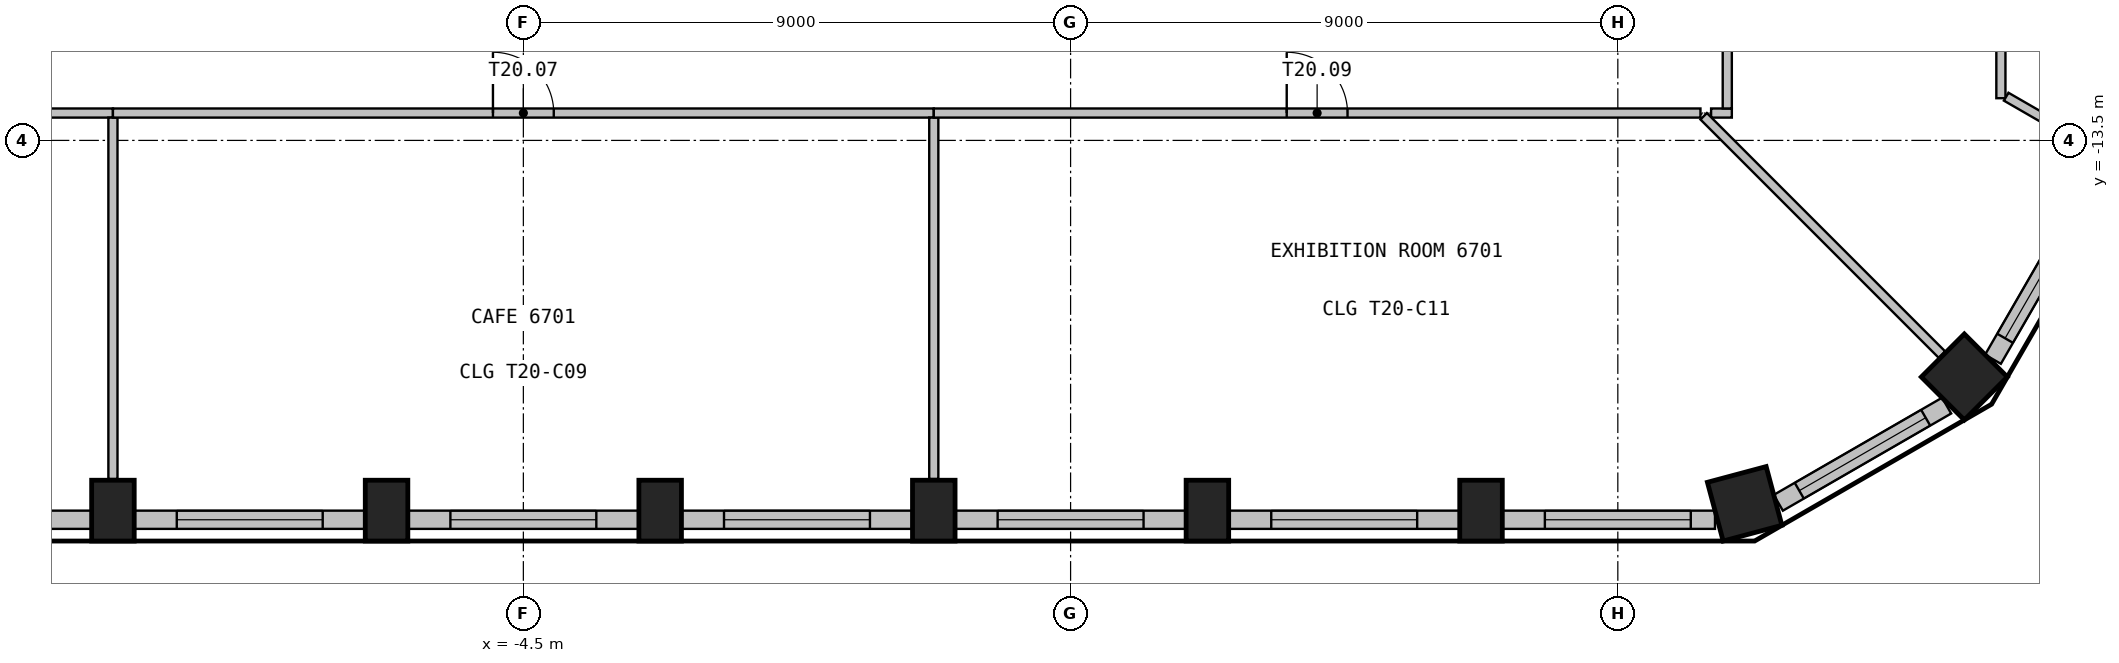
"""IFC4 building model, lengths in metres.
Left out: names, types, materials, properties, quantities, classifications, styles, units other than length and angle.
Written with IfcOpenShell. Run it as: python <this file> out.ifc"""

import sys

from ifc_helpers import new_model, si_unit, direction, frame, frame_2d, origin, origin_2d, place, context, subcontext, project, spatial, rectangle, extrude, element, fill, save


model = new_model("IFC4")
c1 = context("Model", 3, precision=1e-05, world=origin(), true_north=direction((0.0, 1.0)))
c2 = subcontext(c1, "Body", "Model", "MODEL_VIEW")
j1 = project(units=[si_unit("LENGTHUNIT", "METRE"), si_unit("PLANEANGLEUNIT", "RADIAN")], contexts=[c1])
p1 = place(None, origin())
s1 = spatial("IfcSite", under=j1, at=p1, CompositionType="ELEMENT")
p2 = place(p1, origin())
s2 = spatial("IfcBuilding", under=s1, at=p2, CompositionType="ELEMENT")
p3 = place(p2, frame((0.0, 0.0, 270.3)))
s3 = spatial("IfcBuildingStorey", under=s2, at=p3, CompositionType="ELEMENT", Elevation=270.3)
for number, where, z_axis, x_axis in (
    (1, (-11.25, -19.588, 0.0), (0.0, 0.0, 1.0), (1.0, 0.0, 0.0)),
    (2, (-6.75, -19.588, 0.0), (0.0, 0.0, 1.0), (1.0, 0.0, 0.0)),
    (3, (-2.25, -19.588, 0.0), (0.0, 0.0, 1.0), (1.0, 0.0, 0.0)),
    (4, (2.25, -19.588, 0.0), (0.0, 0.0, 1.0), (1.0, 0.0, 0.0)),
    (5, (6.75, -19.588, 0.0), (0.0, 0.0, 1.0), (1.0, 0.0, 0.0)),
    (6, (11.25, -19.588, 0.0), (0.0, 0.0, 1.0), (1.0, 0.0, 0.0)),
):
    element("IfcColumn", number, at=place(p3, frame(where, z_axis=z_axis, x_axis=x_axis)), inside=s3, PredefinedType="COLUMN", context=c2, shape_type="SweptSolid", body=[
        extrude(rectangle(XDim=0.7, YDim=1.0, at=origin_2d()), origin(), (0.0, 0.0, 1.0), 3.575),
    ])
for number, where, z_axis, x_axis in (
    (7, (15.586, -19.476, 0.0), (0.0, 0.0, 1.0), (0.966, 0.259, 0.0)),
    (8, (19.199, -17.39, 0.0), (0.0, 0.0, 1.0), (0.707, 0.707, 0.0)),
):
    element("IfcColumn", number, at=place(p3, frame(where, z_axis=z_axis, x_axis=x_axis)), inside=s3, PredefinedType="COLUMN", context=c2, shape_type="SweptSolid", body=[
        extrude(rectangle(XDim=1.0, YDim=1.0, at=origin_2d()), origin(), (0.0, 0.0, 1.0), 3.575),
    ])
p4 = place(p3, frame((-15.098, -19.739, 0.0), z_axis=(0.0, 0.0, 1.0), x_axis=(1.0, 0.0, 0.0)))
e9 = element("IfcWall", 9, at=p4, inside=s3, PredefinedType="SOLIDWALL", context=c2, shape_type="SweptSolid", body=[
    extrude(rectangle(XDim=3.498, YDim=0.3, at=frame_2d((1.749, 0.0))), origin(), (0.0, 0.0, 1.0), 3.575),
])
p5 = place(p4, frame((0.398, 0.0, 0.9)))
e10 = element("IfcOpeningElement", 10, at=p5, cuts=e9, PredefinedType="OPENING", context=c2, shape_type="SweptSolid", body=[
    extrude(rectangle(XDim=2.4, YDim=2.1, at=frame_2d((1.2, 1.05))), frame((0.0, 0.16, 0.0), z_axis=(0.0, -1.0, 0.0), x_axis=(1.0, 0.0, 0.0)), (0.0, 0.0, 1.0), 0.32),
])
p6 = place(p3, frame((-10.899, -19.739, 0.0), z_axis=(0.0, 0.0, 1.0), x_axis=(1.0, 0.0, 0.0)))
e11 = element("IfcWall", 11, at=p6, inside=s3, PredefinedType="SOLIDWALL", context=c2, shape_type="SweptSolid", body=[
    extrude(rectangle(XDim=3.799, YDim=0.3, at=frame_2d((1.899, 0.0))), origin(), (0.0, 0.0, 1.0), 3.575),
])
p7 = place(p6, frame((0.699, 0.0, 0.9)))
e12 = element("IfcOpeningElement", 12, at=p7, cuts=e11, PredefinedType="OPENING", context=c2, shape_type="SweptSolid", body=[
    extrude(rectangle(XDim=2.4, YDim=2.1, at=frame_2d((1.2, 1.05))), frame((0.0, 0.16, 0.0), z_axis=(0.0, -1.0, 0.0), x_axis=(1.0, 0.0, 0.0)), (0.0, 0.0, 1.0), 0.32),
])
p8 = place(p3, frame((-6.399, -19.739, 0.0), z_axis=(0.0, 0.0, 1.0), x_axis=(1.0, 0.0, 0.0)))
e13 = element("IfcWall", 13, at=p8, inside=s3, PredefinedType="SOLIDWALL", context=c2, shape_type="SweptSolid", body=[
    extrude(rectangle(XDim=3.799, YDim=0.3, at=frame_2d((1.899, 0.0))), origin(), (0.0, 0.0, 1.0), 3.575),
])
p9 = place(p8, frame((0.699, 0.0, 0.9)))
e14 = element("IfcOpeningElement", 14, at=p9, cuts=e13, PredefinedType="OPENING", context=c2, shape_type="SweptSolid", body=[
    extrude(rectangle(XDim=2.4, YDim=2.1, at=frame_2d((1.2, 1.05))), frame((0.0, 0.16, 0.0), z_axis=(0.0, -1.0, 0.0), x_axis=(1.0, 0.0, 0.0)), (0.0, 0.0, 1.0), 0.32),
])
p10 = place(p3, frame((-1.899, -19.739, 0.0), z_axis=(0.0, 0.0, 1.0), x_axis=(1.0, 0.0, 0.0)))
e15 = element("IfcWall", 15, at=p10, inside=s3, PredefinedType="SOLIDWALL", context=c2, shape_type="SweptSolid", body=[
    extrude(rectangle(XDim=3.799, YDim=0.3, at=frame_2d((1.899, 0.0))), origin(), (0.0, 0.0, 1.0), 3.575),
])
p11 = place(p10, frame((0.699, 0.0, 0.9)))
e16 = element("IfcOpeningElement", 16, at=p11, cuts=e15, PredefinedType="OPENING", context=c2, shape_type="SweptSolid", body=[
    extrude(rectangle(XDim=2.4, YDim=2.1, at=frame_2d((1.2, 1.05))), frame((0.0, 0.16, 0.0), z_axis=(0.0, -1.0, 0.0), x_axis=(1.0, 0.0, 0.0)), (0.0, 0.0, 1.0), 0.32),
])
p12 = place(p3, frame((2.601, -19.739, 0.0), z_axis=(0.0, 0.0, 1.0), x_axis=(1.0, 0.0, 0.0)))
e17 = element("IfcWall", 17, at=p12, inside=s3, PredefinedType="SOLIDWALL", context=c2, shape_type="SweptSolid", body=[
    extrude(rectangle(XDim=3.799, YDim=0.3, at=frame_2d((1.899, 0.0))), origin(), (0.0, 0.0, 1.0), 3.575),
])
p13 = place(p12, frame((0.699, 0.0, 0.9)))
e18 = element("IfcOpeningElement", 18, at=p13, cuts=e17, PredefinedType="OPENING", context=c2, shape_type="SweptSolid", body=[
    extrude(rectangle(XDim=2.4, YDim=2.1, at=frame_2d((1.2, 1.05))), frame((0.0, 0.16, 0.0), z_axis=(0.0, -1.0, 0.0), x_axis=(1.0, 0.0, 0.0)), (0.0, 0.0, 1.0), 0.32),
])
p14 = place(p3, frame((7.101, -19.739, 0.0), z_axis=(0.0, 0.0, 1.0), x_axis=(1.0, 0.0, 0.0)))
e19 = element("IfcWall", 19, at=p14, inside=s3, PredefinedType="SOLIDWALL", context=c2, shape_type="SweptSolid", body=[
    extrude(rectangle(XDim=3.799, YDim=0.3, at=frame_2d((1.899, 0.0))), origin(), (0.0, 0.0, 1.0), 3.575),
])
p15 = place(p14, frame((0.699, 0.0, 0.9)))
e20 = element("IfcOpeningElement", 20, at=p15, cuts=e19, PredefinedType="OPENING", context=c2, shape_type="SweptSolid", body=[
    extrude(rectangle(XDim=2.4, YDim=2.1, at=frame_2d((1.2, 1.05))), frame((0.0, 0.16, 0.0), z_axis=(0.0, -1.0, 0.0), x_axis=(1.0, 0.0, 0.0)), (0.0, 0.0, 1.0), 0.32),
])
p16 = place(p3, frame((11.601, -19.739, 0.0), z_axis=(0.0, 0.0, 1.0), x_axis=(1.0, 0.0, 0.0)))
e21 = element("IfcWall", 21, at=p16, inside=s3, PredefinedType="SOLIDWALL", context=c2, shape_type="SweptSolid", body=[
    extrude(rectangle(XDim=3.498, YDim=0.3, at=frame_2d((1.749, 0.0))), origin(), (0.0, 0.0, 1.0), 3.575),
])
p17 = place(p16, frame((0.699, 0.0, 0.9)))
e22 = element("IfcOpeningElement", 22, at=p17, cuts=e21, PredefinedType="OPENING", context=c2, shape_type="SweptSolid", body=[
    extrude(rectangle(XDim=2.4, YDim=2.1, at=frame_2d((1.2, 1.05))), frame((0.0, 0.16, 0.0), z_axis=(0.0, -1.0, 0.0), x_axis=(1.0, 0.0, 0.0)), (0.0, 0.0, 1.0), 0.32),
])
p18 = place(p3, frame((16.14, -19.459, 0.0), z_axis=(0.0, 0.0, 1.0), x_axis=(0.866025316205, 0.500000151692, 0.0)))
e23 = element("IfcWall", 23, at=p18, inside=s3, PredefinedType="SOLIDWALL", context=c2, shape_type="SweptSolid", body=[
    extrude(rectangle(XDim=3.196, YDim=0.3, at=frame_2d((1.598, 0.0))), origin(), (0.0, 0.0, 1.0), 3.575),
])
p19 = place(p18, frame((0.398, 0.0, 0.9)))
e24 = element("IfcOpeningElement", 24, at=p19, cuts=e23, PredefinedType="OPENING", context=c2, shape_type="SweptSolid", body=[
    extrude(rectangle(XDim=2.4, YDim=2.1, at=frame_2d((1.2, 1.05))), frame((0.0, 0.16, 0.0), z_axis=(0.0, -1.0, 0.0), x_axis=(1.0, 0.0, 0.0)), (0.0, 0.0, 1.0), 0.32),
])
p20 = place(p3, frame((19.67, -17.099, 0.0), z_axis=(0.0, 0.0, 1.0), x_axis=(0.499960102815, 0.866048437209, 0.0)))
e25 = element("IfcWall", 25, at=p20, inside=s3, PredefinedType="SOLIDWALL", context=c2, shape_type="SweptSolid", body=[
    extrude(rectangle(XDim=3.498, YDim=0.3, at=frame_2d((1.749, 0.0))), origin(), (0.0, 0.0, 1.0), 3.575),
])
p21 = place(p20, frame((0.398, 0.0, 0.9)))
e26 = element("IfcOpeningElement", 26, at=p21, cuts=e25, PredefinedType="OPENING", context=c2, shape_type="SweptSolid", body=[
    extrude(rectangle(XDim=2.4, YDim=2.1, at=frame_2d((1.2, 1.05))), frame((0.0, 0.16, 0.0), z_axis=(0.0, -1.0, 0.0), x_axis=(1.0, 0.0, 0.0)), (0.0, 0.0, 1.0), 0.32),
])
p22 = place(p3, frame((-15.225, -13.05, 0.0), z_axis=(0.0, 0.0, 1.0), x_axis=(1.0, 0.0, 0.0)))
e27 = element("IfcWall", 27, at=p22, inside=s3, PredefinedType="PARTITIONING", context=c2, shape_type="SweptSolid", body=[
    extrude(rectangle(XDim=3.975, YDim=0.15, at=frame_2d((1.988, 0.0))), origin(), (0.0, 0.0, 1.0), 3.575),
])
p23 = place(p3, frame((-11.25, -13.125, 0.0), z_axis=(0.0, 0.0, 1.0), x_axis=(0.0, -1.0, 0.0)))
e28 = element("IfcWall", 28, at=p23, inside=s3, PredefinedType="PARTITIONING", context=c2, shape_type="SweptSolid", body=[
    extrude(rectangle(XDim=5.944, YDim=0.15, at=frame_2d((2.972, 0.0))), origin(), (0.0, 0.0, 1.0), 3.575),
])
p24 = place(p3, frame((-11.25, -13.05, 0.0), z_axis=(0.0, 0.0, 1.0), x_axis=(1.0, 0.0, 0.0)))
e29 = element("IfcWall", 29, at=p24, inside=s3, PredefinedType="PARTITIONING", context=c2, shape_type="SweptSolid", body=[
    extrude(rectangle(XDim=13.5, YDim=0.15, at=frame_2d((6.75, 0.0))), origin(), (0.0, 0.0, 1.0), 3.575),
])
p25 = place(p24, frame((6.25, 0.0, 0.0)))
e30 = element("IfcOpeningElement", 30, at=p25, cuts=e29, PredefinedType="OPENING", context=c2, shape_type="SweptSolid", body=[
    extrude(rectangle(XDim=1.0, YDim=2.1, at=frame_2d((0.5, 1.05))), frame((0.0, 0.085, 0.0), z_axis=(0.0, -1.0, 0.0), x_axis=(1.0, 0.0, 0.0)), (0.0, 0.0, 1.0), 0.17),
])
p26 = place(p3, frame((2.25, -13.125, 0.0), z_axis=(0.0, 0.0, 1.0), x_axis=(0.0, -1.0, 0.0)))
e31 = element("IfcWall", 31, at=p26, inside=s3, PredefinedType="PARTITIONING", context=c2, shape_type="SweptSolid", body=[
    extrude(rectangle(XDim=5.944, YDim=0.15, at=frame_2d((2.972, 0.0))), origin(), (0.0, 0.0, 1.0), 3.575),
])
p27 = place(p3, frame((2.25, -13.05, 0.0), z_axis=(0.0, 0.0, 1.0), x_axis=(1.0, 0.0, 0.0)))
e32 = element("IfcWall", 32, at=p27, inside=s3, PredefinedType="PARTITIONING", context=c2, shape_type="SweptSolid", body=[
    extrude(rectangle(XDim=12.609, YDim=0.15, at=frame_2d((6.304, 0.0))), origin(), (0.0, 0.0, 1.0), 3.575),
])
p28 = place(p27, frame((5.804, 0.0, 0.0)))
e33 = element("IfcOpeningElement", 33, at=p28, cuts=e32, PredefinedType="OPENING", context=c2, shape_type="SweptSolid", body=[
    extrude(rectangle(XDim=1.0, YDim=2.1, at=frame_2d((0.5, 1.05))), frame((0.0, 0.085, 0.0), z_axis=(0.0, -1.0, 0.0), x_axis=(1.0, 0.0, 0.0)), (0.0, 0.0, 1.0), 0.17),
])
p29 = place(p3, frame((15.034, -13.05, 0.0), z_axis=(0.0, 0.0, 1.0), x_axis=(1.0, 0.0, 0.0)))
e34 = element("IfcWall", 34, at=p29, inside=s3, PredefinedType="PARTITIONING", context=c2, shape_type="SweptSolid", body=[
    extrude(rectangle(XDim=0.341, YDim=0.15, at=frame_2d((0.17, 0.0))), origin(), (0.0, 0.0, 1.0), 3.575),
])
p30 = place(p3, frame((14.912, -13.103, 0.0), z_axis=(0.0, 0.0, 1.0), x_axis=(0.707018679171, -0.707194872226, 0.0)))
e35 = element("IfcWall", 35, at=p30, inside=s3, PredefinedType="PARTITIONING", context=c2, shape_type="SweptSolid", body=[
    extrude(rectangle(XDim=5.542, YDim=0.15, at=frame_2d((2.771, 0.0))), origin(), (0.0, 0.0, 1.0), 3.575),
])
p31 = place(p3, frame((15.3, -12.975, 0.0), z_axis=(0.0, 0.0, 1.0), x_axis=(0.0, 1.0, 0.0)))
e36 = element("IfcWall", 36, at=p31, inside=s3, PredefinedType="PARTITIONING", context=c2, shape_type="SweptSolid", body=[
    extrude(rectangle(XDim=10.8, YDim=0.15, at=frame_2d((5.4, 0.0))), origin(), (0.0, 0.0, 1.0), 3.575),
])
p32 = place(p31, frame((4.9, 0.0, 0.0)))
e37 = element("IfcOpeningElement", 37, at=p32, cuts=e36, PredefinedType="OPENING", context=c2, shape_type="SweptSolid", body=[
    extrude(rectangle(XDim=1.0, YDim=2.1, at=frame_2d((0.5, 1.05))), frame((0.0, 0.085, 0.0), z_axis=(0.0, -1.0, 0.0), x_axis=(1.0, 0.0, 0.0)), (0.0, 0.0, 1.0), 0.17),
])
p33 = place(p3, frame((19.8, -2.325, 0.0), z_axis=(0.0, 0.0, 1.0), x_axis=(0.0, -1.0, 0.0)))
e38 = element("IfcWall", 38, at=p33, inside=s3, PredefinedType="PARTITIONING", context=c2, shape_type="SweptSolid", body=[
    extrude(rectangle(XDim=10.481, YDim=0.15, at=frame_2d((5.24, 0.0))), origin(), (0.0, 0.0, 1.0), 3.575),
])
p34 = place(p3, frame((19.887, -12.781, 0.0), z_axis=(0.0, 0.0, 1.0), x_axis=(0.866110606688, -0.499852395195, 0.0)))
e39 = element("IfcWall", 39, at=p34, inside=s3, PredefinedType="PARTITIONING", context=c2, shape_type="SweptSolid", body=[
    extrude(rectangle(XDim=1.301, YDim=0.15, at=frame_2d((0.651, 0.0))), origin(), (0.0, 0.0, 1.0), 3.575),
])
p35 = place(p7, origin())
e40 = element("IfcWindow", 40, at=p35, inside=s3, PartitioningType="SINGLE_PANEL", PredefinedType="WINDOW", context=c2, shape_type="SweptSolid", body=[
    extrude(rectangle(XDim=2.4, YDim=2.1, at=frame_2d((1.2, 1.05))), frame((0.0, 0.03, 0.0), z_axis=(0.0, -1.0, 0.0), x_axis=(1.0, 0.0, 0.0)), (0.0, 0.0, 1.0), 0.06),
])
fill(e12, e40)
p36 = place(p9, origin())
e41 = element("IfcWindow", 41, at=p36, inside=s3, PartitioningType="SINGLE_PANEL", PredefinedType="WINDOW", context=c2, shape_type="SweptSolid", body=[
    extrude(rectangle(XDim=2.4, YDim=2.1, at=frame_2d((1.2, 1.05))), frame((0.0, 0.03, 0.0), z_axis=(0.0, -1.0, 0.0), x_axis=(1.0, 0.0, 0.0)), (0.0, 0.0, 1.0), 0.06),
])
fill(e14, e41)
p37 = place(p11, origin())
e42 = element("IfcWindow", 42, at=p37, inside=s3, PartitioningType="SINGLE_PANEL", PredefinedType="WINDOW", context=c2, shape_type="SweptSolid", body=[
    extrude(rectangle(XDim=2.4, YDim=2.1, at=frame_2d((1.2, 1.05))), frame((0.0, 0.03, 0.0), z_axis=(0.0, -1.0, 0.0), x_axis=(1.0, 0.0, 0.0)), (0.0, 0.0, 1.0), 0.06),
])
fill(e16, e42)
p38 = place(p13, origin())
e43 = element("IfcWindow", 43, at=p38, inside=s3, PartitioningType="SINGLE_PANEL", PredefinedType="WINDOW", context=c2, shape_type="SweptSolid", body=[
    extrude(rectangle(XDim=2.4, YDim=2.1, at=frame_2d((1.2, 1.05))), frame((0.0, 0.03, 0.0), z_axis=(0.0, -1.0, 0.0), x_axis=(1.0, 0.0, 0.0)), (0.0, 0.0, 1.0), 0.06),
])
fill(e18, e43)
p39 = place(p15, origin())
e44 = element("IfcWindow", 44, at=p39, inside=s3, PartitioningType="SINGLE_PANEL", PredefinedType="WINDOW", context=c2, shape_type="SweptSolid", body=[
    extrude(rectangle(XDim=2.4, YDim=2.1, at=frame_2d((1.2, 1.05))), frame((0.0, 0.03, 0.0), z_axis=(0.0, -1.0, 0.0), x_axis=(1.0, 0.0, 0.0)), (0.0, 0.0, 1.0), 0.06),
])
fill(e20, e44)
p40 = place(p17, origin())
e45 = element("IfcWindow", 45, at=p40, inside=s3, PartitioningType="SINGLE_PANEL", PredefinedType="WINDOW", context=c2, shape_type="SweptSolid", body=[
    extrude(rectangle(XDim=2.4, YDim=2.1, at=frame_2d((1.2, 1.05))), frame((0.0, 0.03, 0.0), z_axis=(0.0, -1.0, 0.0), x_axis=(1.0, 0.0, 0.0)), (0.0, 0.0, 1.0), 0.06),
])
fill(e22, e45)
p41 = place(p19, origin())
e46 = element("IfcWindow", 46, at=p41, inside=s3, PartitioningType="SINGLE_PANEL", PredefinedType="WINDOW", context=c2, shape_type="SweptSolid", body=[
    extrude(rectangle(XDim=2.4, YDim=2.1, at=frame_2d((1.2, 1.05))), frame((0.0, 0.03, 0.0), z_axis=(0.0, -1.0, 0.0), x_axis=(1.0, 0.0, 0.0)), (0.0, 0.0, 1.0), 0.06),
])
fill(e24, e46)
p42 = place(p21, origin())
e47 = element("IfcWindow", 47, at=p42, inside=s3, PartitioningType="SINGLE_PANEL", PredefinedType="WINDOW", context=c2, shape_type="SweptSolid", body=[
    extrude(rectangle(XDim=2.4, YDim=2.1, at=frame_2d((1.2, 1.05))), frame((0.0, 0.03, 0.0), z_axis=(0.0, -1.0, 0.0), x_axis=(1.0, 0.0, 0.0)), (0.0, 0.0, 1.0), 0.06),
])
fill(e26, e47)
p43 = place(p25, origin())
e48 = element("IfcDoor", 48, at=p43, inside=s3, OperationType="SINGLE_SWING_LEFT", PredefinedType="DOOR", context=c2, shape_type="SweptSolid", body=[
    extrude(rectangle(XDim=1.0, YDim=2.1, at=frame_2d((0.5, 1.05))), frame((0.0, 0.025, 0.0), z_axis=(0.0, -1.0, 0.0), x_axis=(1.0, 0.0, 0.0)), (0.0, 0.0, 1.0), 0.05),
])
fill(e30, e48)
p44 = place(p28, origin())
e49 = element("IfcDoor", 49, at=p44, inside=s3, OperationType="SINGLE_SWING_LEFT", PredefinedType="DOOR", context=c2, shape_type="SweptSolid", body=[
    extrude(rectangle(XDim=1.0, YDim=2.1, at=frame_2d((0.5, 1.05))), frame((0.0, 0.025, 0.0), z_axis=(0.0, -1.0, 0.0), x_axis=(1.0, 0.0, 0.0)), (0.0, 0.0, 1.0), 0.05),
])
fill(e33, e49)
save(model, sys.argv[1])
